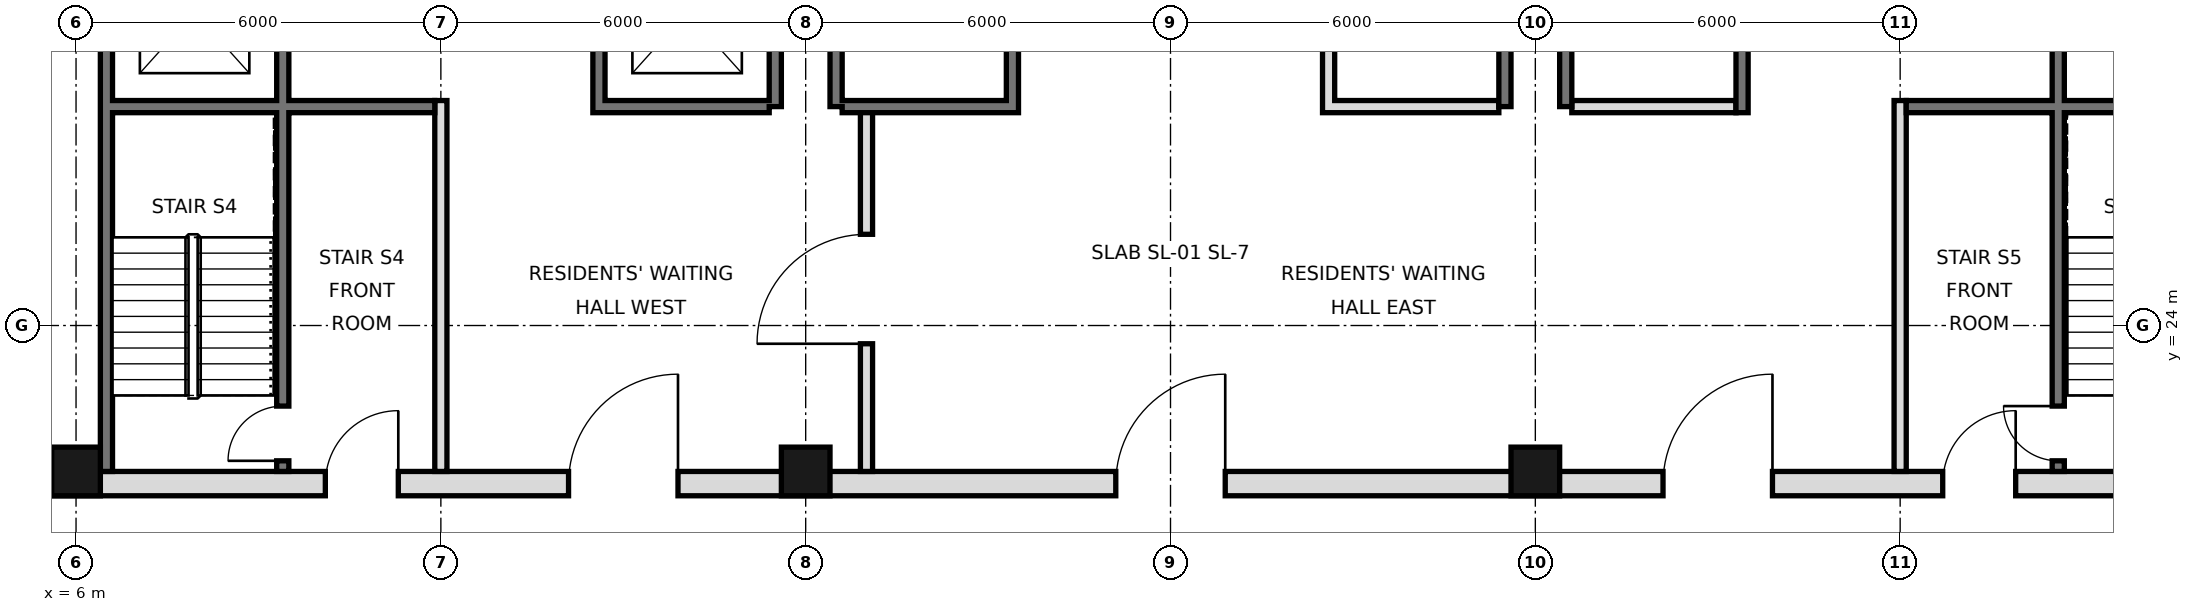
"""IFC4 building model, lengths in metres.
Left out: names, types, materials, properties, quantities, classifications, styles, units other than length and angle.
Written with IfcOpenShell. Run it as: python <this file> out.ifc"""

import sys

from ifc_helpers import new_model, si_unit, direction, frame, frame_2d, origin, origin_2d, place, context, subcontext, project, spatial, rectangle, hollow_rectangle, extrude, element, fill, save


model = new_model("IFC4")
c1 = context("Model", 3, precision=1e-05, world=origin(), true_north=direction((0.0, 1.0)))
c2 = subcontext(c1, "Body", "Model", "MODEL_VIEW")
j1 = project(units=[si_unit("LENGTHUNIT", "METRE"), si_unit("PLANEANGLEUNIT", "RADIAN")], contexts=[c1])
p1 = place(None, origin())
s1 = spatial("IfcSite", under=j1, at=p1, CompositionType="ELEMENT")
p2 = place(p1, origin())
s2 = spatial("IfcBuilding", under=s1, at=p2, CompositionType="ELEMENT")
p3 = place(p2, frame((0.0, 0.0, 67.8)))
s3 = spatial("IfcBuildingStorey", under=s2, at=p3, CompositionType="ELEMENT", Elevation=67.8)
for number, where, z_axis, x_axis in (
    (1, (6.0, 21.6, 0.0), (0.0, 0.0, 1.0), (1.0, 0.0, 0.0)),
    (2, (18.0, 21.6, 0.0), (0.0, 0.0, 1.0), (1.0, 0.0, 0.0)),
    (3, (30.0, 21.6, 0.0), (0.0, 0.0, 1.0), (1.0, 0.0, 0.0)),
):
    element("IfcColumn", number, at=place(p3, frame(where, z_axis=z_axis, x_axis=x_axis)), inside=s3, PredefinedType="COLUMN", context=c2, shape_type="SweptSolid", body=[
        extrude(hollow_rectangle(XDim=0.8, YDim=0.8, WallThickness=0.06, at=origin_2d()), origin(), (0.0, 0.0, 1.0), 3.6),
    ])
p4 = place(p3, frame((6.5, 21.6, 0.0), z_axis=(0.0, 0.0, 1.0), x_axis=(0.0, 1.0, 0.0)))
e4 = element("IfcWall", 4, at=p4, inside=s3, PredefinedType="SOLIDWALL", context=c2, shape_type="SweptSolid", body=[
    extrude(rectangle(XDim=23.5, YDim=0.2, at=frame_2d((11.75, 0.0))), origin(), (0.0, 0.0, 1.0), 3.42),
])
for number, where, z_axis, x_axis in (
    (5, (17.5, 27.6, 0.0), (0.0, 0.0, 1.0), (0.0, 1.0, 0.0)),
    (6, (18.5, 27.6, 0.0), (0.0, 0.0, 1.0), (0.0, 1.0, 0.0)),
    (7, (29.5, 27.6, 0.0), (0.0, 0.0, 1.0), (0.0, 1.0, 0.0)),
    (8, (30.5, 27.6, 0.0), (0.0, 0.0, 1.0), (0.0, 1.0, 0.0)),
):
    element("IfcWall", number, at=place(p3, frame(where, z_axis=z_axis, x_axis=x_axis)), inside=s3, PredefinedType="SOLIDWALL", context=c2, shape_type="SweptSolid", body=[
        extrude(rectangle(XDim=17.5, YDim=0.2, at=frame_2d((8.75, 0.0))), origin(), (0.0, 0.0, 1.0), 3.42),
    ])
p5 = place(p3, frame((5.6, 21.4, 0.0), z_axis=(0.0, 0.0, 1.0), x_axis=(1.0, 0.0, 0.0)))
e9 = element("IfcWall", 9, at=p5, inside=s3, PredefinedType="SOLIDWALL", context=c2, shape_type="SweptSolid", body=[
    extrude(rectangle(XDim=36.8, YDim=0.4, at=frame_2d((18.4, 0.0))), origin(), (0.0, 0.0, 1.0), 3.42),
])
p6 = place(p5, frame((8.5, 0.0, 0.0)))
e10 = element("IfcOpeningElement", 10, at=p6, cuts=e9, PredefinedType="OPENING", context=c2, shape_type="SweptSolid", body=[
    extrude(rectangle(XDim=1.8, YDim=2.1, at=frame_2d((0.9, 1.05))), frame((0.0, 0.21, 0.0), z_axis=(0.0, -1.0, 0.0), x_axis=(1.0, 0.0, 0.0)), (0.0, 0.0, 1.0), 0.42),
])
p7 = place(p5, frame((17.5, 0.0, 0.0)))
e11 = element("IfcOpeningElement", 11, at=p7, cuts=e9, PredefinedType="OPENING", context=c2, shape_type="SweptSolid", body=[
    extrude(rectangle(XDim=1.8, YDim=2.1, at=frame_2d((0.9, 1.05))), frame((0.0, 0.21, 0.0), z_axis=(0.0, -1.0, 0.0), x_axis=(1.0, 0.0, 0.0)), (0.0, 0.0, 1.0), 0.42),
])
p8 = place(p5, frame((26.5, 0.0, 0.0)))
e12 = element("IfcOpeningElement", 12, at=p8, cuts=e9, PredefinedType="OPENING", context=c2, shape_type="SweptSolid", body=[
    extrude(rectangle(XDim=1.8, YDim=2.1, at=frame_2d((0.9, 1.05))), frame((0.0, 0.21, 0.0), z_axis=(0.0, -1.0, 0.0), x_axis=(1.0, 0.0, 0.0)), (0.0, 0.0, 1.0), 0.42),
])
p9 = place(p5, frame((4.5, 0.0, 0.0)))
e13 = element("IfcOpeningElement", 13, at=p9, cuts=e9, PredefinedType="OPENING", context=c2, shape_type="SweptSolid", body=[
    extrude(rectangle(XDim=1.2, YDim=2.1, at=frame_2d((0.6, 1.05))), frame((0.0, 0.21, 0.0), z_axis=(0.0, -1.0, 0.0), x_axis=(1.0, 0.0, 0.0)), (0.0, 0.0, 1.0), 0.42),
])
p10 = place(p5, frame((31.1, 0.0, 0.0)))
e14 = element("IfcOpeningElement", 14, at=p10, cuts=e9, PredefinedType="OPENING", context=c2, shape_type="SweptSolid", body=[
    extrude(rectangle(XDim=1.2, YDim=2.1, at=frame_2d((0.6, 1.05))), frame((0.0, 0.21, 0.0), z_axis=(0.0, -1.0, 0.0), x_axis=(1.0, 0.0, 0.0)), (0.0, 0.0, 1.0), 0.42),
])
p11 = place(p3, frame((19.0, 21.6, 0.0), z_axis=(0.0, 0.0, 1.0), x_axis=(0.0, 1.0, 0.0)))
e15 = element("IfcWall", 15, at=p11, inside=s3, PredefinedType="PARTITIONING", context=c2, shape_type="SweptSolid", body=[
    extrude(rectangle(XDim=6.0, YDim=0.2, at=frame_2d((3.0, 0.0))), origin(), (0.0, 0.0, 1.0), 3.42),
])
p12 = place(p11, frame((2.1, 0.0, 0.0)))
e16 = element("IfcOpeningElement", 16, at=p12, cuts=e15, PredefinedType="OPENING", context=c2, shape_type="SweptSolid", body=[
    extrude(rectangle(XDim=1.8, YDim=2.1, at=frame_2d((0.9, 1.05))), frame((0.0, 0.11, 0.0), z_axis=(0.0, -1.0, 0.0), x_axis=(1.0, 0.0, 0.0)), (0.0, 0.0, 1.0), 0.22),
])
p13 = place(p3, frame((12.0, 21.6, 0.0), z_axis=(0.0, 0.0, 1.0), x_axis=(0.0, 1.0, 0.0)))
e17 = element("IfcWall", 17, at=p13, inside=s3, PredefinedType="PARTITIONING", context=c2, shape_type="SweptSolid", body=[
    extrude(rectangle(XDim=6.1, YDim=0.2, at=frame_2d((3.05, 0.0))), origin(), (0.0, 0.0, 1.0), 3.42),
])
p14 = place(p3, frame((14.6, 27.5, 0.0), z_axis=(0.0, 0.0, 1.0), x_axis=(0.0, 1.0, 0.0)))
e18 = element("IfcWall", 18, at=p14, inside=s3, PredefinedType="SOLIDWALL", context=c2, shape_type="SweptSolid", body=[
    extrude(rectangle(XDim=17.5, YDim=0.2, at=frame_2d((8.75, 0.0))), origin(), (0.0, 0.0, 1.0), 3.42),
])
p15 = place(p14, frame((1.1, 0.0, 0.0)))
e19 = element("IfcOpeningElement", 19, at=p15, cuts=e18, PredefinedType="OPENING", context=c2, shape_type="SweptSolid", body=[
    extrude(rectangle(XDim=1.1, YDim=2.1, at=frame_2d((0.55, 1.05))), frame((0.0, 0.11, 0.0), z_axis=(0.0, -1.0, 0.0), x_axis=(1.0, 0.0, 0.0)), (0.0, 0.0, 1.0), 0.22),
])
p16 = place(p14, frame((4.2, 0.0, 0.0)))
e20 = element("IfcOpeningElement", 20, at=p16, cuts=e18, PredefinedType="OPENING", context=c2, shape_type="SweptSolid", body=[
    extrude(rectangle(XDim=1.1, YDim=2.1, at=frame_2d((0.55, 1.05))), frame((0.0, 0.11, 0.0), z_axis=(0.0, -1.0, 0.0), x_axis=(1.0, 0.0, 0.0)), (0.0, 0.0, 1.0), 0.22),
])
p17 = place(p14, frame((15.4, 0.0, 0.0)))
e21 = element("IfcOpeningElement", 21, at=p17, cuts=e18, PredefinedType="OPENING", context=c2, shape_type="SweptSolid", body=[
    extrude(rectangle(XDim=1.1, YDim=2.1, at=frame_2d((0.55, 1.05))), frame((0.0, 0.11, 0.0), z_axis=(0.0, -1.0, 0.0), x_axis=(1.0, 0.0, 0.0)), (0.0, 0.0, 1.0), 0.22),
])
p18 = place(p14, frame((9.9, 0.0, 0.0)))
e22 = element("IfcOpeningElement", 22, at=p18, cuts=e18, PredefinedType="OPENING", context=c2, shape_type="SweptSolid", body=[
    extrude(rectangle(XDim=0.9, YDim=2.1, at=frame_2d((0.45, 1.05))), frame((0.0, 0.11, 0.0), z_axis=(0.0, -1.0, 0.0), x_axis=(1.0, 0.0, 0.0)), (0.0, 0.0, 1.0), 0.22),
])
p19 = place(p3, frame((21.4, 27.5, 0.0), z_axis=(0.0, 0.0, 1.0), x_axis=(0.0, 1.0, 0.0)))
e23 = element("IfcWall", 23, at=p19, inside=s3, PredefinedType="SOLIDWALL", context=c2, shape_type="SweptSolid", body=[
    extrude(rectangle(XDim=17.5, YDim=0.2, at=frame_2d((8.75, 0.0))), origin(), (0.0, 0.0, 1.0), 3.42),
])
p20 = place(p19, frame((9.8, 0.0, 0.0)))
e24 = element("IfcOpeningElement", 24, at=p20, cuts=e23, PredefinedType="OPENING", context=c2, shape_type="SweptSolid", body=[
    extrude(rectangle(XDim=1.0, YDim=2.1, at=frame_2d((0.5, 1.05))), frame((0.0, 0.11, 0.0), z_axis=(0.0, -1.0, 0.0), x_axis=(1.0, 0.0, 0.0)), (0.0, 0.0, 1.0), 0.22),
])
p21 = place(p19, frame((7.4, 0.0, 0.0)))
e25 = element("IfcOpeningElement", 25, at=p21, cuts=e23, PredefinedType="OPENING", context=c2, shape_type="SweptSolid", body=[
    extrude(rectangle(XDim=0.9, YDim=2.1, at=frame_2d((0.45, 1.05))), frame((0.0, 0.11, 0.0), z_axis=(0.0, -1.0, 0.0), x_axis=(1.0, 0.0, 0.0)), (0.0, 0.0, 1.0), 0.22),
])
p22 = place(p3, frame((26.6, 27.5, 0.0), z_axis=(0.0, 0.0, 1.0), x_axis=(0.0, 1.0, 0.0)))
e26 = element("IfcWall", 26, at=p22, inside=s3, PredefinedType="SOLIDWALL", context=c2, shape_type="SweptSolid", body=[
    extrude(rectangle(XDim=17.5, YDim=0.2, at=frame_2d((8.75, 0.0))), origin(), (0.0, 0.0, 1.0), 3.42),
])
p23 = place(p22, frame((4.3, 0.0, 0.0)))
e27 = element("IfcOpeningElement", 27, at=p23, cuts=e26, PredefinedType="OPENING", context=c2, shape_type="SweptSolid", body=[
    extrude(rectangle(XDim=0.9, YDim=2.1, at=frame_2d((0.45, 1.05))), frame((0.0, 0.11, 0.0), z_axis=(0.0, -1.0, 0.0), x_axis=(1.0, 0.0, 0.0)), (0.0, 0.0, 1.0), 0.22),
])
p24 = place(p22, frame((10.35, 0.0, 0.0)))
e28 = element("IfcOpeningElement", 28, at=p24, cuts=e26, PredefinedType="OPENING", context=c2, shape_type="SweptSolid", body=[
    extrude(rectangle(XDim=1.0, YDim=2.1, at=frame_2d((0.5, 1.05))), frame((0.0, 0.11, 0.0), z_axis=(0.0, -1.0, 0.0), x_axis=(1.0, 0.0, 0.0)), (0.0, 0.0, 1.0), 0.22),
])
p25 = place(p3, frame((33.4, 27.5, 0.0), z_axis=(0.0, 0.0, 1.0), x_axis=(0.0, 1.0, 0.0)))
e29 = element("IfcWall", 29, at=p25, inside=s3, PredefinedType="SOLIDWALL", context=c2, shape_type="SweptSolid", body=[
    extrude(rectangle(XDim=17.5, YDim=0.2, at=frame_2d((8.75, 0.0))), origin(), (0.0, 0.0, 1.0), 3.42),
])
p26 = place(p25, frame((15.4, 0.0, 0.0)))
e30 = element("IfcOpeningElement", 30, at=p26, cuts=e29, PredefinedType="OPENING", context=c2, shape_type="SweptSolid", body=[
    extrude(rectangle(XDim=1.1, YDim=2.1, at=frame_2d((0.55, 1.05))), frame((0.0, 0.11, 0.0), z_axis=(0.0, -1.0, 0.0), x_axis=(1.0, 0.0, 0.0)), (0.0, 0.0, 1.0), 0.22),
])
p27 = place(p25, frame((2.7, 0.0, 0.0)))
e31 = element("IfcOpeningElement", 31, at=p27, cuts=e29, PredefinedType="OPENING", context=c2, shape_type="SweptSolid", body=[
    extrude(rectangle(XDim=1.0, YDim=2.1, at=frame_2d((0.5, 1.05))), frame((0.0, 0.11, 0.0), z_axis=(0.0, -1.0, 0.0), x_axis=(1.0, 0.0, 0.0)), (0.0, 0.0, 1.0), 0.22),
])
p28 = place(p25, frame((9.9, 0.0, 0.0)))
e32 = element("IfcOpeningElement", 32, at=p28, cuts=e29, PredefinedType="OPENING", context=c2, shape_type="SweptSolid", body=[
    extrude(rectangle(XDim=0.9, YDim=2.1, at=frame_2d((0.45, 1.05))), frame((0.0, 0.11, 0.0), z_axis=(0.0, -1.0, 0.0), x_axis=(1.0, 0.0, 0.0)), (0.0, 0.0, 1.0), 0.22),
])
p29 = place(p3, frame((36.0, 21.6, 0.0), z_axis=(0.0, 0.0, 1.0), x_axis=(0.0, 1.0, 0.0)))
e33 = element("IfcWall", 33, at=p29, inside=s3, PredefinedType="PARTITIONING", context=c2, shape_type="SweptSolid", body=[
    extrude(rectangle(XDim=6.1, YDim=0.2, at=frame_2d((3.05, 0.0))), origin(), (0.0, 0.0, 1.0), 3.42),
])
p30 = place(p3, frame((38.6, 21.6, 0.0), z_axis=(0.0, 0.0, 1.0), x_axis=(0.0, 1.0, 0.0)))
e34 = element("IfcWall", 34, at=p30, inside=s3, PredefinedType="SOLIDWALL", context=c2, shape_type="SweptSolid", body=[
    extrude(rectangle(XDim=23.4, YDim=0.2, at=frame_2d((11.7, 0.0))), origin(), (0.0, 0.0, 1.0), 3.42),
])
p31 = place(p30, frame((8.6, 0.0, 0.0)))
e35 = element("IfcOpeningElement", 35, at=p31, cuts=e34, PredefinedType="OPENING", context=c2, shape_type="SweptSolid", body=[
    extrude(rectangle(XDim=1.0, YDim=2.1, at=frame_2d((0.5, 1.05))), frame((0.0, 0.11, 0.0), z_axis=(0.0, -1.0, 0.0), x_axis=(1.0, 0.0, 0.0)), (0.0, 0.0, 1.0), 0.22),
])
p32 = place(p30, frame((13.25, 0.0, 0.0)))
e36 = element("IfcOpeningElement", 36, at=p32, cuts=e34, PredefinedType="OPENING", context=c2, shape_type="SweptSolid", body=[
    extrude(rectangle(XDim=1.0, YDim=2.1, at=frame_2d((0.5, 1.05))), frame((0.0, 0.11, 0.0), z_axis=(0.0, -1.0, 0.0), x_axis=(1.0, 0.0, 0.0)), (0.0, 0.0, 1.0), 0.22),
])
p33 = place(p30, frame((15.7, 0.0, 0.0)))
e37 = element("IfcOpeningElement", 37, at=p33, cuts=e34, PredefinedType="OPENING", context=c2, shape_type="SweptSolid", body=[
    extrude(rectangle(XDim=1.0, YDim=2.1, at=frame_2d((0.5, 1.05))), frame((0.0, 0.11, 0.0), z_axis=(0.0, -1.0, 0.0), x_axis=(1.0, 0.0, 0.0)), (0.0, 0.0, 1.0), 0.22),
])
p34 = place(p30, frame((0.175, 0.0, 0.0)))
e38 = element("IfcOpeningElement", 38, at=p34, cuts=e34, PredefinedType="OPENING", context=c2, shape_type="SweptSolid", body=[
    extrude(rectangle(XDim=0.9, YDim=2.1, at=frame_2d((0.45, 1.05))), frame((0.0, 0.11, 0.0), z_axis=(0.0, -1.0, 0.0), x_axis=(1.0, 0.0, 0.0)), (0.0, 0.0, 1.0), 0.22),
])
p35 = place(p3, frame((9.4, 21.6, 0.0), z_axis=(0.0, 0.0, 1.0), x_axis=(0.0, 1.0, 0.0)))
e39 = element("IfcWall", 39, at=p35, inside=s3, PredefinedType="SOLIDWALL", context=c2, shape_type="SweptSolid", body=[
    extrude(rectangle(XDim=23.4, YDim=0.2, at=frame_2d((11.7, 0.0))), origin(), (0.0, 0.0, 1.0), 3.42),
])
p36 = place(p35, frame((7.0, 0.0, 0.0)))
e40 = element("IfcOpeningElement", 40, at=p36, cuts=e39, PredefinedType="OPENING", context=c2, shape_type="SweptSolid", body=[
    extrude(rectangle(XDim=1.1, YDim=2.1, at=frame_2d((0.55, 1.05))), frame((0.0, 0.11, 0.0), z_axis=(0.0, -1.0, 0.0), x_axis=(1.0, 0.0, 0.0)), (0.0, 0.0, 1.0), 0.22),
])
p37 = place(p35, frame((10.1, 0.0, 0.0)))
e41 = element("IfcOpeningElement", 41, at=p37, cuts=e39, PredefinedType="OPENING", context=c2, shape_type="SweptSolid", body=[
    extrude(rectangle(XDim=1.1, YDim=2.1, at=frame_2d((0.55, 1.05))), frame((0.0, 0.11, 0.0), z_axis=(0.0, -1.0, 0.0), x_axis=(1.0, 0.0, 0.0)), (0.0, 0.0, 1.0), 0.22),
])
p38 = place(p35, frame((13.2, 0.0, 0.0)))
e42 = element("IfcOpeningElement", 42, at=p38, cuts=e39, PredefinedType="OPENING", context=c2, shape_type="SweptSolid", body=[
    extrude(rectangle(XDim=1.1, YDim=2.1, at=frame_2d((0.55, 1.05))), frame((0.0, 0.11, 0.0), z_axis=(0.0, -1.0, 0.0), x_axis=(1.0, 0.0, 0.0)), (0.0, 0.0, 1.0), 0.22),
])
p39 = place(p35, frame((15.7, 0.0, 0.0)))
e43 = element("IfcOpeningElement", 43, at=p39, cuts=e39, PredefinedType="OPENING", context=c2, shape_type="SweptSolid", body=[
    extrude(rectangle(XDim=1.0, YDim=2.1, at=frame_2d((0.5, 1.05))), frame((0.0, 0.11, 0.0), z_axis=(0.0, -1.0, 0.0), x_axis=(1.0, 0.0, 0.0)), (0.0, 0.0, 1.0), 0.22),
])
p40 = place(p35, frame((0.175, 0.0, 0.0)))
e44 = element("IfcOpeningElement", 44, at=p40, cuts=e39, PredefinedType="OPENING", context=c2, shape_type="SweptSolid", body=[
    extrude(rectangle(XDim=0.9, YDim=2.1, at=frame_2d((0.45, 1.05))), frame((0.0, 0.11, 0.0), z_axis=(0.0, -1.0, 0.0), x_axis=(1.0, 0.0, 0.0)), (0.0, 0.0, 1.0), 0.22),
])
for number, where, z_axis, x_axis in (
    (45, (14.7, 27.6, 0.0), (0.0, 0.0, 1.0), (1.0, 0.0, 0.0)),
    (46, (18.6, 27.6, 0.0), (0.0, 0.0, 1.0), (1.0, 0.0, 0.0)),
    (47, (26.7, 27.6, 0.0), (0.0, 0.0, 1.0), (1.0, 0.0, 0.0)),
):
    element("IfcWall", number, at=place(p3, frame(where, z_axis=z_axis, x_axis=x_axis)), inside=s3, PredefinedType="SOLIDWALL", context=c2, shape_type="SweptSolid", body=[
        extrude(rectangle(XDim=2.7, YDim=0.2, at=frame_2d((1.35, 0.0))), origin(), (0.0, 0.0, 1.0), 3.42),
    ])
p41 = place(p3, frame((30.6, 27.6, 0.0), z_axis=(0.0, 0.0, 1.0), x_axis=(1.0, 0.0, 0.0)))
e48 = element("IfcWall", 48, at=p41, inside=s3, PredefinedType="PARTITIONING", context=c2, shape_type="SweptSolid", body=[
    extrude(rectangle(XDim=2.7, YDim=0.2, at=frame_2d((1.35, 0.0))), origin(), (0.0, 0.0, 1.0), 3.42),
])
for number, where, z_axis, x_axis in (
    (49, (36.1, 27.6, 0.0), (0.0, 0.0, 1.0), (1.0, 0.0, 0.0)),
    (50, (6.6, 27.6, 0.0), (0.0, 0.0, 1.0), (1.0, 0.0, 0.0)),
):
    element("IfcWall", number, at=place(p3, frame(where, z_axis=z_axis, x_axis=x_axis)), inside=s3, PredefinedType="SOLIDWALL", context=c2, shape_type="SweptSolid", body=[
        extrude(rectangle(XDim=5.3, YDim=0.2, at=frame_2d((2.65, 0.0))), origin(), (0.0, 0.0, 1.0), 3.42),
    ])
p42 = place(p6, frame((1.8, 0.0, 0.0), z_axis=(0.0, 0.0, 1.0), x_axis=(-1.0, 0.0, 0.0)))
e51 = element("IfcDoor", 51, at=p42, inside=s3, OperationType="SINGLE_SWING_LEFT", PredefinedType="DOOR", context=c2, shape_type="SweptSolid", body=[
    extrude(rectangle(XDim=1.8, YDim=2.1, at=frame_2d((0.9, 1.05))), frame((0.0, 0.025, 0.0), z_axis=(0.0, -1.0, 0.0), x_axis=(1.0, 0.0, 0.0)), (0.0, 0.0, 1.0), 0.05),
])
fill(e10, e51)
p43 = place(p12, origin())
e52 = element("IfcDoor", 52, at=p43, inside=s3, OperationType="SINGLE_SWING_LEFT", PredefinedType="DOOR", context=c2, shape_type="SweptSolid", body=[
    extrude(rectangle(XDim=1.8, YDim=2.1, at=frame_2d((0.9, 1.05))), frame((0.0, 0.025, 0.0), z_axis=(0.0, -1.0, 0.0), x_axis=(1.0, 0.0, 0.0)), (0.0, 0.0, 1.0), 0.05),
])
fill(e16, e52)
p44 = place(p7, frame((1.8, 0.0, 0.0), z_axis=(0.0, 0.0, 1.0), x_axis=(-1.0, 0.0, 0.0)))
e53 = element("IfcDoor", 53, at=p44, inside=s3, OperationType="SINGLE_SWING_LEFT", PredefinedType="DOOR", context=c2, shape_type="SweptSolid", body=[
    extrude(rectangle(XDim=1.8, YDim=2.1, at=frame_2d((0.9, 1.05))), frame((0.0, 0.025, 0.0), z_axis=(0.0, -1.0, 0.0), x_axis=(1.0, 0.0, 0.0)), (0.0, 0.0, 1.0), 0.05),
])
fill(e11, e53)
p45 = place(p8, frame((1.8, 0.0, 0.0), z_axis=(0.0, 0.0, 1.0), x_axis=(-1.0, 0.0, 0.0)))
e54 = element("IfcDoor", 54, at=p45, inside=s3, OperationType="SINGLE_SWING_LEFT", PredefinedType="DOOR", context=c2, shape_type="SweptSolid", body=[
    extrude(rectangle(XDim=1.8, YDim=2.1, at=frame_2d((0.9, 1.05))), frame((0.0, 0.025, 0.0), z_axis=(0.0, -1.0, 0.0), x_axis=(1.0, 0.0, 0.0)), (0.0, 0.0, 1.0), 0.05),
])
fill(e12, e54)
p46 = place(p9, frame((1.2, 0.0, 0.0), z_axis=(0.0, 0.0, 1.0), x_axis=(-1.0, 0.0, 0.0)))
e55 = element("IfcDoor", 55, at=p46, inside=s3, OperationType="SINGLE_SWING_LEFT", PredefinedType="DOOR", context=c2, shape_type="SweptSolid", body=[
    extrude(rectangle(XDim=1.2, YDim=2.1, at=frame_2d((0.6, 1.05))), frame((0.0, 0.025, 0.0), z_axis=(0.0, -1.0, 0.0), x_axis=(1.0, 0.0, 0.0)), (0.0, 0.0, 1.0), 0.05),
])
fill(e13, e55)
p47 = place(p10, frame((1.2, 0.0, 0.0), z_axis=(0.0, 0.0, 1.0), x_axis=(-1.0, 0.0, 0.0)))
e56 = element("IfcDoor", 56, at=p47, inside=s3, OperationType="SINGLE_SWING_LEFT", PredefinedType="DOOR", context=c2, shape_type="SweptSolid", body=[
    extrude(rectangle(XDim=1.2, YDim=2.1, at=frame_2d((0.6, 1.05))), frame((0.0, 0.025, 0.0), z_axis=(0.0, -1.0, 0.0), x_axis=(1.0, 0.0, 0.0)), (0.0, 0.0, 1.0), 0.05),
])
fill(e14, e56)
p48 = place(p40, origin())
e57 = element("IfcDoor", 57, at=p48, inside=s3, OperationType="SINGLE_SWING_LEFT", PredefinedType="DOOR", context=c2, shape_type="SweptSolid", body=[
    extrude(rectangle(XDim=0.9, YDim=2.1, at=frame_2d((0.45, 1.05))), frame((0.0, 0.025, 0.0), z_axis=(0.0, -1.0, 0.0), x_axis=(1.0, 0.0, 0.0)), (0.0, 0.0, 1.0), 0.05),
])
fill(e44, e57)
p49 = place(p34, frame((0.9, 0.0, 0.0), z_axis=(0.0, 0.0, 1.0), x_axis=(-1.0, 0.0, 0.0)))
e58 = element("IfcDoor", 58, at=p49, inside=s3, OperationType="SINGLE_SWING_LEFT", PredefinedType="DOOR", context=c2, shape_type="SweptSolid", body=[
    extrude(rectangle(XDim=0.9, YDim=2.1, at=frame_2d((0.45, 1.05))), frame((0.0, 0.025, 0.0), z_axis=(0.0, -1.0, 0.0), x_axis=(1.0, 0.0, 0.0)), (0.0, 0.0, 1.0), 0.05),
])
fill(e38, e58)
save(model, sys.argv[1])
